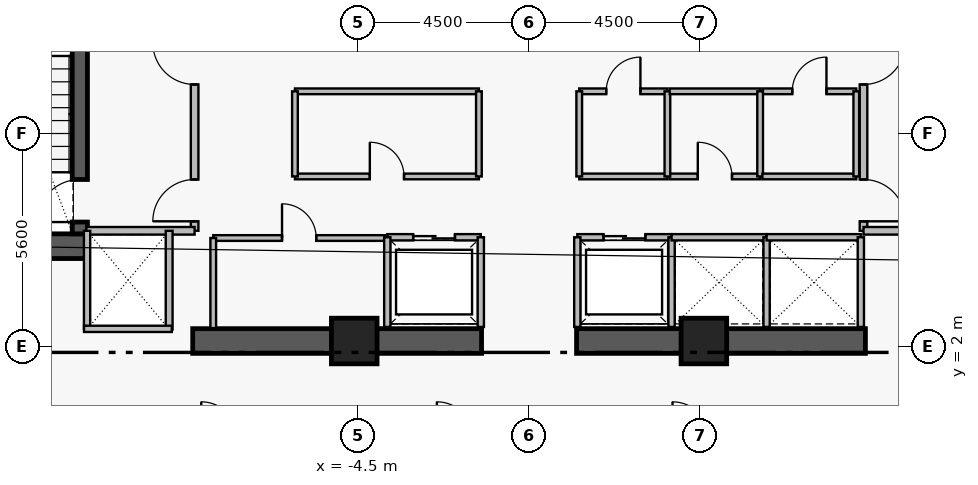
"""IFC4 building model, lengths in metres.
Left out: names, types, materials, properties, quantities, classifications, styles, units other than length and angle.
Written with IfcOpenShell. Run it as: python <this file> out.ifc"""

import sys

from ifc_helpers import new_model, si_unit, direction, frame, frame_2d, origin, origin_2d, place, context, subcontext, project, spatial, rectangle, extrude, element, fill, save


model = new_model("IFC4")
c1 = context("Model", 3, precision=1e-05, world=origin(), true_north=direction((0.0, 1.0)))
c2 = subcontext(c1, "Body", "Model", "MODEL_VIEW")
j1 = project(units=[si_unit("LENGTHUNIT", "METRE"), si_unit("PLANEANGLEUNIT", "RADIAN")], contexts=[c1])
p1 = place(None, origin())
s1 = spatial("IfcSite", under=j1, at=p1, CompositionType="ELEMENT")
p2 = place(p1, origin())
s2 = spatial("IfcBuilding", under=s1, at=p2, CompositionType="ELEMENT")
p3 = place(p2, frame((0.0, 0.0, 192.4)))
s3 = spatial("IfcBuildingStorey", under=s2, at=p3, CompositionType="ELEMENT", Elevation=192.4)
p4 = place(p3, frame((-16.06, 4.645, 0.0), z_axis=(0.0, 0.0, 1.0), x_axis=(1.0, 0.0, 0.0)))
e1 = element("IfcWall", 1, at=p4, inside=s3, PredefinedType="SHEAR", context=c2, shape_type="SweptSolid", body=[
    extrude(rectangle(XDim=4.46, YDim=0.65, at=frame_2d((2.23, 0.0))), origin(), (0.0, 0.0, 1.0), 3.56),
])
for number, where, z_axis, x_axis in (
    (2, (-8.85, 2.15, 0.0), (0.0, 0.0, 1.0), (1.0, 0.0, 0.0)),
    (3, (1.25, 2.15, 0.0), (0.0, 0.0, 1.0), (1.0, 0.0, 0.0)),
):
    element("IfcWall", number, at=place(p3, frame(where, z_axis=z_axis, x_axis=x_axis)), inside=s3, PredefinedType="SHEAR", context=c2, shape_type="SweptSolid", body=[
        extrude(rectangle(XDim=7.6, YDim=0.65, at=frame_2d((3.8, 0.0))), origin(), (0.0, 0.0, 1.0), 3.53),
    ])
p5 = place(p3, frame((-11.82, 4.97, 0.0), z_axis=(0.0, 0.0, 1.0), x_axis=(0.0, 1.0, 0.0)))
e4 = element("IfcWall", 4, at=p5, inside=s3, PredefinedType="SHEAR", context=c2, shape_type="SweptSolid", body=[
    extrude(rectangle(XDim=8.96, YDim=0.4, at=frame_2d((4.48, 0.0))), origin(), (0.0, 0.0, 1.0), 3.56),
])
p6 = place(p5, frame((0.31, 0.0, 0.0)))
e5 = element("IfcOpeningElement", 5, at=p6, cuts=e4, PredefinedType="OPENING", context=c2, shape_type="SweptSolid", body=[
    extrude(rectangle(XDim=1.12, YDim=2.22, at=frame_2d((0.56, 1.11))), frame((0.0, 0.21, 0.0), z_axis=(0.0, -1.0, 0.0), x_axis=(1.0, 0.0, 0.0)), (0.0, 0.0, 1.0), 0.42),
])
for number, where, z_axis, x_axis in (
    (6, (-4.6, 2.15, 0.0), (0.0, 0.0, 1.0), (1.0, 0.0, 0.0)),
    (7, (4.6, 2.15, 0.0), (0.0, 0.0, 1.0), (1.0, 0.0, 0.0)),
):
    element("IfcColumn", number, at=place(p3, frame(where, z_axis=z_axis, x_axis=x_axis)), inside=s3, PredefinedType="COLUMN", context=c2, shape_type="SweptSolid", body=[
        extrude(rectangle(XDim=1.2, YDim=1.2, at=origin_2d()), origin(), (0.0, 0.0, 1.0), 3.75),
    ])
p7 = place(p3, frame((-8.8, 5.05, 0.0), z_axis=(0.0, 0.0, 1.0), x_axis=(0.0, 1.0, 0.0)))
e8 = element("IfcWall", 8, at=p7, inside=s3, PredefinedType="PARTITIONING", context=c2, shape_type="SweptSolid", body=[
    extrude(rectangle(XDim=6.1, YDim=0.2, at=frame_2d((3.05, 0.0))), origin(), (0.0, 0.0, 1.0), 3.53),
])
p8 = place(p7, frame((0.25, 0.0, 0.0)))
e9 = element("IfcOpeningElement", 9, at=p8, cuts=e8, PredefinedType="OPENING", context=c2, shape_type="SweptSolid", body=[
    extrude(rectangle(XDim=1.1, YDim=2.2, at=frame_2d((0.55, 1.1))), frame((0.0, 0.11, 0.0), z_axis=(0.0, -1.0, 0.0), x_axis=(1.0, 0.0, 0.0)), (0.0, 0.0, 1.0), 0.22),
])
p9 = place(p7, frame((3.85, 0.0, 0.0)))
e10 = element("IfcOpeningElement", 10, at=p9, cuts=e8, PredefinedType="OPENING", context=c2, shape_type="SweptSolid", body=[
    extrude(rectangle(XDim=1.1, YDim=2.2, at=frame_2d((0.55, 1.1))), frame((0.0, 0.11, 0.0), z_axis=(0.0, -1.0, 0.0), x_axis=(1.0, 0.0, 0.0)), (0.0, 0.0, 1.0), 0.22),
])
p10 = place(p3, frame((8.8, 11.15, 0.0), z_axis=(0.0, 0.0, 1.0), x_axis=(0.0, -1.0, 0.0)))
e11 = element("IfcWall", 11, at=p10, inside=s3, PredefinedType="PARTITIONING", context=c2, shape_type="SweptSolid", body=[
    extrude(rectangle(XDim=6.1, YDim=0.2, at=frame_2d((3.05, 0.0))), origin(), (0.0, 0.0, 1.0), 3.53),
])
p11 = place(p10, frame((1.15, 0.0, 0.0)))
e12 = element("IfcOpeningElement", 12, at=p11, cuts=e11, PredefinedType="OPENING", context=c2, shape_type="SweptSolid", body=[
    extrude(rectangle(XDim=1.1, YDim=2.2, at=frame_2d((0.55, 1.1))), frame((0.0, 0.11, 0.0), z_axis=(0.0, -1.0, 0.0), x_axis=(1.0, 0.0, 0.0)), (0.0, 0.0, 1.0), 0.22),
])
p12 = place(p10, frame((4.75, 0.0, 0.0)))
e13 = element("IfcOpeningElement", 13, at=p12, cuts=e11, PredefinedType="OPENING", context=c2, shape_type="SweptSolid", body=[
    extrude(rectangle(XDim=1.1, YDim=2.2, at=frame_2d((0.55, 1.1))), frame((0.0, 0.11, 0.0), z_axis=(0.0, -1.0, 0.0), x_axis=(1.0, 0.0, 0.0)), (0.0, 0.0, 1.0), 0.22),
])
p13 = place(p3, frame((-3.73, 4.88, 0.0), z_axis=(0.0, 0.0, 1.0), x_axis=(1.0, 0.0, 0.0)))
e14 = element("IfcWall", 14, at=p13, inside=s3, PredefinedType="PARTITIONING", context=c2, shape_type="SweptSolid", body=[
    extrude(rectangle(XDim=2.46, YDim=0.165, at=frame_2d((1.23, 0.0))), origin(), (0.0, 0.0, 1.0), 3.53),
])
p14 = place(p13, frame((0.68, 0.0, 0.0)))
e15 = element("IfcOpeningElement", 15, at=p14, cuts=e14, PredefinedType="OPENING", context=c2, shape_type="SweptSolid", body=[
    extrude(rectangle(XDim=1.1, YDim=2.25, at=frame_2d((0.55, 1.125))), frame((0.0, 0.093, 0.0), z_axis=(0.0, -1.0, 0.0), x_axis=(1.0, 0.0, 0.0)), (0.0, 0.0, 1.0), 0.185),
])
p15 = place(p3, frame((1.27, 4.88, 0.0), z_axis=(0.0, 0.0, 1.0), x_axis=(1.0, 0.0, 0.0)))
e16 = element("IfcWall", 16, at=p15, inside=s3, PredefinedType="PARTITIONING", context=c2, shape_type="SweptSolid", body=[
    extrude(rectangle(XDim=2.48, YDim=0.165, at=frame_2d((1.24, 0.0))), origin(), (0.0, 0.0, 1.0), 3.53),
])
p16 = place(p15, frame((0.69, 0.0, 0.0)))
e17 = element("IfcOpeningElement", 17, at=p16, cuts=e16, PredefinedType="OPENING", context=c2, shape_type="SweptSolid", body=[
    extrude(rectangle(XDim=1.1, YDim=2.25, at=frame_2d((0.55, 1.125))), frame((0.0, 0.093, 0.0), z_axis=(0.0, -1.0, 0.0), x_axis=(1.0, 0.0, 0.0)), (0.0, 0.0, 1.0), 0.185),
])
p17 = place(p3, frame((-8.31, 4.86, 0.0), z_axis=(0.0, 0.0, 1.0), x_axis=(1.0, 0.0, 0.0)))
e18 = element("IfcWall", 18, at=p17, inside=s3, PredefinedType="PARTITIONING", context=c2, shape_type="SweptSolid", body=[
    extrude(rectangle(XDim=4.52, YDim=0.15, at=frame_2d((2.26, 0.0))), origin(), (0.0, 0.0, 1.0), 3.53),
])
p18 = place(p17, frame((1.81, 0.0, 0.0)))
e19 = element("IfcOpeningElement", 19, at=p18, cuts=e18, PredefinedType="OPENING", context=c2, shape_type="SweptSolid", body=[
    extrude(rectangle(XDim=0.9, YDim=2.15, at=frame_2d((0.45, 1.075))), frame((0.0, 0.085, 0.0), z_axis=(0.0, -1.0, 0.0), x_axis=(1.0, 0.0, 0.0)), (0.0, 0.0, 1.0), 0.17),
])
p19 = place(p3, frame((-6.16, 6.48, 0.0), z_axis=(0.0, 0.0, 1.0), x_axis=(1.0, 0.0, 0.0)))
e20 = element("IfcWall", 20, at=p19, inside=s3, PredefinedType="PARTITIONING", context=c2, shape_type="SweptSolid", body=[
    extrude(rectangle(XDim=4.84, YDim=0.15, at=frame_2d((2.42, 0.0))), origin(), (0.0, 0.0, 1.0), 3.53),
])
p20 = place(p19, frame((1.97, 0.0, 0.0)))
e21 = element("IfcOpeningElement", 21, at=p20, cuts=e20, PredefinedType="OPENING", context=c2, shape_type="SweptSolid", body=[
    extrude(rectangle(XDim=0.9, YDim=2.15, at=frame_2d((0.45, 1.075))), frame((0.0, 0.085, 0.0), z_axis=(0.0, -1.0, 0.0), x_axis=(1.0, 0.0, 0.0)), (0.0, 0.0, 1.0), 0.17),
])
p21 = place(p3, frame((1.32, 8.72, 0.0), z_axis=(0.0, 0.0, 1.0), x_axis=(1.0, 0.0, 0.0)))
e22 = element("IfcWall", 22, at=p21, inside=s3, PredefinedType="PARTITIONING", context=c2, shape_type="SweptSolid", body=[
    extrude(rectangle(XDim=2.32, YDim=0.15, at=frame_2d((1.16, 0.0))), origin(), (0.0, 0.0, 1.0), 3.53),
])
p22 = place(p21, frame((0.71, 0.0, 0.0)))
e23 = element("IfcOpeningElement", 23, at=p22, cuts=e22, PredefinedType="OPENING", context=c2, shape_type="SweptSolid", body=[
    extrude(rectangle(XDim=0.9, YDim=2.15, at=frame_2d((0.45, 1.075))), frame((0.0, 0.085, 0.0), z_axis=(0.0, -1.0, 0.0), x_axis=(1.0, 0.0, 0.0)), (0.0, 0.0, 1.0), 0.17),
])
p23 = place(p3, frame((3.7, 6.48, 0.0), z_axis=(0.0, 0.0, 1.0), x_axis=(1.0, 0.0, 0.0)))
e24 = element("IfcWall", 24, at=p23, inside=s3, PredefinedType="PARTITIONING", context=c2, shape_type="SweptSolid", body=[
    extrude(rectangle(XDim=2.38, YDim=0.15, at=frame_2d((1.19, 0.0))), origin(), (0.0, 0.0, 1.0), 3.53),
])
p24 = place(p23, frame((0.74, 0.0, 0.0)))
e25 = element("IfcOpeningElement", 25, at=p24, cuts=e24, PredefinedType="OPENING", context=c2, shape_type="SweptSolid", body=[
    extrude(rectangle(XDim=0.9, YDim=2.15, at=frame_2d((0.45, 1.075))), frame((0.0, 0.085, 0.0), z_axis=(0.0, -1.0, 0.0), x_axis=(1.0, 0.0, 0.0)), (0.0, 0.0, 1.0), 0.17),
])
p25 = place(p3, frame((6.14, 8.72, 0.0), z_axis=(0.0, 0.0, 1.0), x_axis=(1.0, 0.0, 0.0)))
e26 = element("IfcWall", 26, at=p25, inside=s3, PredefinedType="PARTITIONING", context=c2, shape_type="SweptSolid", body=[
    extrude(rectangle(XDim=2.47, YDim=0.15, at=frame_2d((1.235, 0.0))), origin(), (0.0, 0.0, 1.0), 3.53),
])
p26 = place(p25, frame((0.785, 0.0, 0.0)))
e27 = element("IfcOpeningElement", 27, at=p26, cuts=e26, PredefinedType="OPENING", context=c2, shape_type="SweptSolid", body=[
    extrude(rectangle(XDim=0.9, YDim=2.15, at=frame_2d((0.45, 1.075))), frame((0.0, 0.085, 0.0), z_axis=(0.0, -1.0, 0.0), x_axis=(1.0, 0.0, 0.0)), (0.0, 0.0, 1.0), 0.17),
])
for number, where, z_axis, x_axis in (
    (28, (-11.65, 5.05, 0.0), (0.0, 0.0, 1.0), (1.0, 0.0, 0.0)),
    (29, (8.8, 5.05, 0.0), (0.0, 0.0, 1.0), (1.0, 0.0, 0.0)),
):
    element("IfcWall", number, at=place(p3, frame(where, z_axis=z_axis, x_axis=x_axis)), inside=s3, PredefinedType="PARTITIONING", context=c2, shape_type="SweptSolid", body=[
        extrude(rectangle(XDim=2.85, YDim=0.2, at=frame_2d((1.425, 0.0))), origin(), (0.0, 0.0, 1.0), 3.53),
    ])
for number, where, z_axis, x_axis in (
    (30, (-3.73, 2.52, 0.0), (0.0, 0.0, 1.0), (0.0, 1.0, 0.0)),
    (31, (-1.27, 2.52, 0.0), (0.0, 0.0, 1.0), (0.0, 1.0, 0.0)),
    (32, (1.27, 2.52, 0.0), (0.0, 0.0, 1.0), (0.0, 1.0, 0.0)),
    (33, (3.75, 2.52, 0.0), (0.0, 0.0, 1.0), (0.0, 1.0, 0.0)),
):
    element("IfcWall", number, at=place(p3, frame(where, z_axis=z_axis, x_axis=x_axis)), inside=s3, PredefinedType="PARTITIONING", context=c2, shape_type="SweptSolid", body=[
        extrude(rectangle(XDim=2.36, YDim=0.165, at=frame_2d((1.18, 0.0))), origin(), (0.0, 0.0, 1.0), 3.53),
    ])
p27 = place(p3, frame((3.75, 4.88, 0.0), z_axis=(0.0, 0.0, 1.0), x_axis=(1.0, 0.0, 0.0)))
e34 = element("IfcWall", 34, at=p27, inside=s3, PredefinedType="PARTITIONING", context=c2, shape_type="SweptSolid", body=[
    extrude(rectangle(XDim=2.5, YDim=0.165, at=frame_2d((1.25, 0.0))), origin(), (0.0, 0.0, 1.0), 3.53),
])
p28 = place(p3, frame((6.25, 2.52, 0.0), z_axis=(0.0, 0.0, 1.0), x_axis=(0.0, 1.0, 0.0)))
e35 = element("IfcWall", 35, at=p28, inside=s3, PredefinedType="PARTITIONING", context=c2, shape_type="SweptSolid", body=[
    extrude(rectangle(XDim=2.36, YDim=0.165, at=frame_2d((1.18, 0.0))), origin(), (0.0, 0.0, 1.0), 3.53),
])
p29 = place(p3, frame((6.25, 4.88, 0.0), z_axis=(0.0, 0.0, 1.0), x_axis=(1.0, 0.0, 0.0)))
e36 = element("IfcWall", 36, at=p29, inside=s3, PredefinedType="PARTITIONING", context=c2, shape_type="SweptSolid", body=[
    extrude(rectangle(XDim=2.48, YDim=0.165, at=frame_2d((1.24, 0.0))), origin(), (0.0, 0.0, 1.0), 3.53),
])
p30 = place(p3, frame((8.73, 2.52, 0.0), z_axis=(0.0, 0.0, 1.0), x_axis=(0.0, 1.0, 0.0)))
e37 = element("IfcWall", 37, at=p30, inside=s3, PredefinedType="PARTITIONING", context=c2, shape_type="SweptSolid", body=[
    extrude(rectangle(XDim=2.36, YDim=0.165, at=frame_2d((1.18, 0.0))), origin(), (0.0, 0.0, 1.0), 3.53),
])
p31 = place(p3, frame((-8.31, 2.49, 0.0), z_axis=(0.0, 0.0, 1.0), x_axis=(0.0, 1.0, 0.0)))
e38 = element("IfcWall", 38, at=p31, inside=s3, PredefinedType="PARTITIONING", context=c2, shape_type="SweptSolid", body=[
    extrude(rectangle(XDim=2.37, YDim=0.15, at=frame_2d((1.185, 0.0))), origin(), (0.0, 0.0, 1.0), 3.53),
])
p32 = place(p3, frame((-9.47, 2.45, 0.0), z_axis=(0.0, 0.0, 1.0), x_axis=(0.0, 1.0, 0.0)))
e39 = element("IfcWall", 39, at=p32, inside=s3, PredefinedType="PARTITIONING", context=c2, shape_type="SweptSolid", body=[
    extrude(rectangle(XDim=2.6, YDim=0.18, at=frame_2d((1.3, 0.0))), origin(), (0.0, 0.0, 1.0), 3.53),
])
p33 = place(p3, frame((-11.63, 2.47, 0.0), z_axis=(0.0, 0.0, 1.0), x_axis=(0.0, 1.0, 0.0)))
e40 = element("IfcWall", 40, at=p33, inside=s3, PredefinedType="PARTITIONING", context=c2, shape_type="SweptSolid", body=[
    extrude(rectangle(XDim=2.58, YDim=0.165, at=frame_2d((1.29, 0.0))), origin(), (0.0, 0.0, 1.0), 3.53),
])
p34 = place(p3, frame((-11.71, 2.47, 0.0), z_axis=(0.0, 0.0, 1.0), x_axis=(1.0, 0.0, 0.0)))
e41 = element("IfcWall", 41, at=p34, inside=s3, PredefinedType="PARTITIONING", context=c2, shape_type="SweptSolid", body=[
    extrude(rectangle(XDim=2.31, YDim=0.165, at=frame_2d((1.155, 0.0))), origin(), (0.0, 0.0, 1.0), 2.43),
])
p35 = place(p3, frame((-6.16, 8.72, 0.0), z_axis=(0.0, 0.0, 1.0), x_axis=(1.0, 0.0, 0.0)))
e42 = element("IfcWall", 42, at=p35, inside=s3, PredefinedType="PARTITIONING", context=c2, shape_type="SweptSolid", body=[
    extrude(rectangle(XDim=4.84, YDim=0.15, at=frame_2d((2.42, 0.0))), origin(), (0.0, 0.0, 1.0), 3.53),
])
for number, where, z_axis, x_axis in (
    (43, (-6.16, 6.48, 0.0), (0.0, 0.0, 1.0), (0.0, 1.0, 0.0)),
    (44, (-1.32, 6.48, 0.0), (0.0, 0.0, 1.0), (0.0, 1.0, 0.0)),
):
    element("IfcWall", number, at=place(p3, frame(where, z_axis=z_axis, x_axis=x_axis)), inside=s3, PredefinedType="PARTITIONING", context=c2, shape_type="SweptSolid", body=[
        extrude(rectangle(XDim=2.24, YDim=0.15, at=frame_2d((1.12, 0.0))), origin(), (0.0, 0.0, 1.0), 3.53),
    ])
p36 = place(p3, frame((1.32, 6.48, 0.0), z_axis=(0.0, 0.0, 1.0), x_axis=(1.0, 0.0, 0.0)))
e45 = element("IfcWall", 45, at=p36, inside=s3, PredefinedType="PARTITIONING", context=c2, shape_type="SweptSolid", body=[
    extrude(rectangle(XDim=2.32, YDim=0.15, at=frame_2d((1.16, 0.0))), origin(), (0.0, 0.0, 1.0), 3.53),
])
for number, where, z_axis, x_axis in (
    (46, (1.32, 6.48, 0.0), (0.0, 0.0, 1.0), (0.0, 1.0, 0.0)),
    (47, (3.64, 6.48, 0.0), (0.0, 0.0, 1.0), (0.0, 1.0, 0.0)),
):
    element("IfcWall", number, at=place(p3, frame(where, z_axis=z_axis, x_axis=x_axis)), inside=s3, PredefinedType="PARTITIONING", context=c2, shape_type="SweptSolid", body=[
        extrude(rectangle(XDim=2.24, YDim=0.15, at=frame_2d((1.12, 0.0))), origin(), (0.0, 0.0, 1.0), 3.53),
    ])
p37 = place(p3, frame((3.7, 8.72, 0.0), z_axis=(0.0, 0.0, 1.0), x_axis=(1.0, 0.0, 0.0)))
e48 = element("IfcWall", 48, at=p37, inside=s3, PredefinedType="PARTITIONING", context=c2, shape_type="SweptSolid", body=[
    extrude(rectangle(XDim=2.38, YDim=0.15, at=frame_2d((1.19, 0.0))), origin(), (0.0, 0.0, 1.0), 3.53),
])
p38 = place(p3, frame((6.08, 6.48, 0.0), z_axis=(0.0, 0.0, 1.0), x_axis=(0.0, 1.0, 0.0)))
e49 = element("IfcWall", 49, at=p38, inside=s3, PredefinedType="PARTITIONING", context=c2, shape_type="SweptSolid", body=[
    extrude(rectangle(XDim=2.24, YDim=0.15, at=frame_2d((1.12, 0.0))), origin(), (0.0, 0.0, 1.0), 3.53),
])
p39 = place(p3, frame((6.14, 6.48, 0.0), z_axis=(0.0, 0.0, 1.0), x_axis=(1.0, 0.0, 0.0)))
e50 = element("IfcWall", 50, at=p39, inside=s3, PredefinedType="PARTITIONING", context=c2, shape_type="SweptSolid", body=[
    extrude(rectangle(XDim=2.47, YDim=0.15, at=frame_2d((1.235, 0.0))), origin(), (0.0, 0.0, 1.0), 3.53),
])
p40 = place(p3, frame((8.61, 6.48, 0.0), z_axis=(0.0, 0.0, 1.0), x_axis=(0.0, 1.0, 0.0)))
e51 = element("IfcWall", 51, at=p40, inside=s3, PredefinedType="PARTITIONING", context=c2, shape_type="SweptSolid", body=[
    extrude(rectangle(XDim=2.24, YDim=0.15, at=frame_2d((1.12, 0.0))), origin(), (0.0, 0.0, 1.0), 3.53),
])
p41 = place(p6, origin())
e52 = element("IfcDoor", 52, at=p41, inside=s3, OperationType="SINGLE_SWING_LEFT", PredefinedType="DOOR", context=c2, shape_type="SweptSolid", body=[
    extrude(rectangle(XDim=1.12, YDim=2.22, at=frame_2d((0.56, 1.11))), frame((0.0, 0.025, 0.0), z_axis=(0.0, -1.0, 0.0), x_axis=(1.0, 0.0, 0.0)), (0.0, 0.0, 1.0), 0.05),
])
fill(e5, e52)
p42 = place(p8, origin())
e53 = element("IfcDoor", 53, at=p42, inside=s3, OperationType="SINGLE_SWING_LEFT", PredefinedType="DOOR", context=c2, shape_type="SweptSolid", body=[
    extrude(rectangle(XDim=1.1, YDim=2.2, at=frame_2d((0.55, 1.1))), frame((0.0, 0.025, 0.0), z_axis=(0.0, -1.0, 0.0), x_axis=(1.0, 0.0, 0.0)), (0.0, 0.0, 1.0), 0.05),
])
fill(e9, e53)
p43 = place(p9, origin())
e54 = element("IfcDoor", 54, at=p43, inside=s3, OperationType="SINGLE_SWING_RIGHT", PredefinedType="DOOR", context=c2, shape_type="SweptSolid", body=[
    extrude(rectangle(XDim=1.1, YDim=2.2, at=frame_2d((0.55, 1.1))), frame((0.0, 0.025, 0.0), z_axis=(0.0, -1.0, 0.0), x_axis=(1.0, 0.0, 0.0)), (0.0, 0.0, 1.0), 0.05),
])
fill(e10, e54)
p44 = place(p11, origin())
e55 = element("IfcDoor", 55, at=p44, inside=s3, OperationType="SINGLE_SWING_LEFT", PredefinedType="DOOR", context=c2, shape_type="SweptSolid", body=[
    extrude(rectangle(XDim=1.1, YDim=2.2, at=frame_2d((0.55, 1.1))), frame((0.0, 0.025, 0.0), z_axis=(0.0, -1.0, 0.0), x_axis=(1.0, 0.0, 0.0)), (0.0, 0.0, 1.0), 0.05),
])
fill(e12, e55)
p45 = place(p12, origin())
e56 = element("IfcDoor", 56, at=p45, inside=s3, OperationType="SINGLE_SWING_RIGHT", PredefinedType="DOOR", context=c2, shape_type="SweptSolid", body=[
    extrude(rectangle(XDim=1.1, YDim=2.2, at=frame_2d((0.55, 1.1))), frame((0.0, 0.025, 0.0), z_axis=(0.0, -1.0, 0.0), x_axis=(1.0, 0.0, 0.0)), (0.0, 0.0, 1.0), 0.05),
])
fill(e13, e56)
p46 = place(p14, origin())
e57 = element("IfcDoor", 57, at=p46, inside=s3, OperationType="SLIDING_TO_LEFT", PredefinedType="DOOR", context=c2, shape_type="SweptSolid", body=[
    extrude(rectangle(XDim=1.1, YDim=2.25, at=frame_2d((0.55, 1.125))), frame((0.0, 0.025, 0.0), z_axis=(0.0, -1.0, 0.0), x_axis=(1.0, 0.0, 0.0)), (0.0, 0.0, 1.0), 0.05),
])
fill(e15, e57)
p47 = place(p16, origin())
e58 = element("IfcDoor", 58, at=p47, inside=s3, OperationType="SLIDING_TO_LEFT", PredefinedType="DOOR", context=c2, shape_type="SweptSolid", body=[
    extrude(rectangle(XDim=1.1, YDim=2.25, at=frame_2d((0.55, 1.125))), frame((0.0, 0.025, 0.0), z_axis=(0.0, -1.0, 0.0), x_axis=(1.0, 0.0, 0.0)), (0.0, 0.0, 1.0), 0.05),
])
fill(e17, e58)
p48 = place(p18, origin())
e59 = element("IfcDoor", 59, at=p48, inside=s3, OperationType="SINGLE_SWING_LEFT", PredefinedType="DOOR", context=c2, shape_type="SweptSolid", body=[
    extrude(rectangle(XDim=0.9, YDim=2.15, at=frame_2d((0.45, 1.075))), frame((0.0, 0.025, 0.0), z_axis=(0.0, -1.0, 0.0), x_axis=(1.0, 0.0, 0.0)), (0.0, 0.0, 1.0), 0.05),
])
fill(e19, e59)
p49 = place(p20, origin())
e60 = element("IfcDoor", 60, at=p49, inside=s3, OperationType="SINGLE_SWING_LEFT", PredefinedType="DOOR", context=c2, shape_type="SweptSolid", body=[
    extrude(rectangle(XDim=0.9, YDim=2.15, at=frame_2d((0.45, 1.075))), frame((0.0, 0.025, 0.0), z_axis=(0.0, -1.0, 0.0), x_axis=(1.0, 0.0, 0.0)), (0.0, 0.0, 1.0), 0.05),
])
fill(e21, e60)
p50 = place(p22, origin())
e61 = element("IfcDoor", 61, at=p50, inside=s3, OperationType="SINGLE_SWING_RIGHT", PredefinedType="DOOR", context=c2, shape_type="SweptSolid", body=[
    extrude(rectangle(XDim=0.9, YDim=2.15, at=frame_2d((0.45, 1.075))), frame((0.0, 0.025, 0.0), z_axis=(0.0, -1.0, 0.0), x_axis=(1.0, 0.0, 0.0)), (0.0, 0.0, 1.0), 0.05),
])
fill(e23, e61)
p51 = place(p24, origin())
e62 = element("IfcDoor", 62, at=p51, inside=s3, OperationType="SINGLE_SWING_LEFT", PredefinedType="DOOR", context=c2, shape_type="SweptSolid", body=[
    extrude(rectangle(XDim=0.9, YDim=2.15, at=frame_2d((0.45, 1.075))), frame((0.0, 0.025, 0.0), z_axis=(0.0, -1.0, 0.0), x_axis=(1.0, 0.0, 0.0)), (0.0, 0.0, 1.0), 0.05),
])
fill(e25, e62)
p52 = place(p26, origin())
e63 = element("IfcDoor", 63, at=p52, inside=s3, OperationType="SINGLE_SWING_RIGHT", PredefinedType="DOOR", context=c2, shape_type="SweptSolid", body=[
    extrude(rectangle(XDim=0.9, YDim=2.15, at=frame_2d((0.45, 1.075))), frame((0.0, 0.025, 0.0), z_axis=(0.0, -1.0, 0.0), x_axis=(1.0, 0.0, 0.0)), (0.0, 0.0, 1.0), 0.05),
])
fill(e27, e63)
save(model, sys.argv[1])
